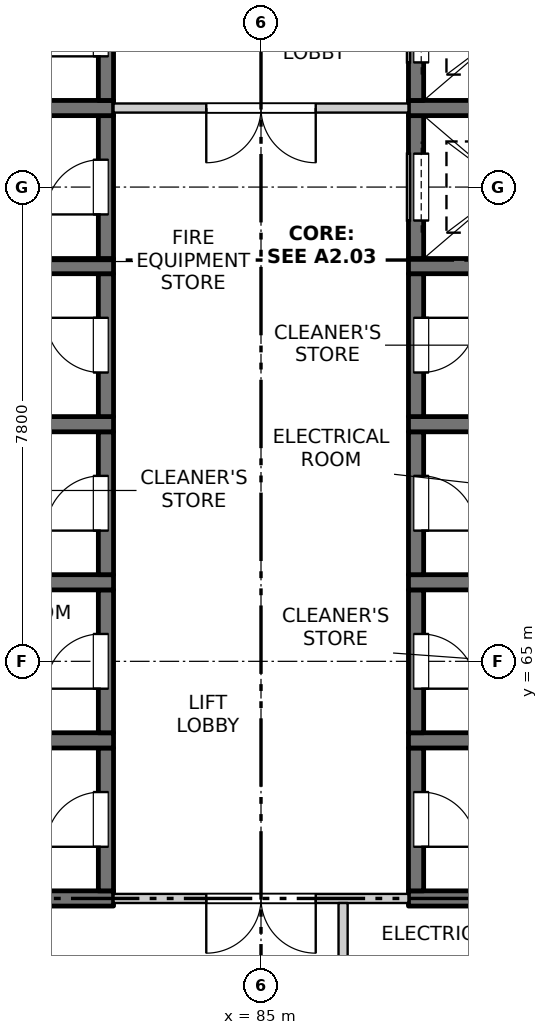
"""IFC4 building model, lengths in metres.
Left out: names, types, materials, properties, quantities, classifications, styles, units other than length and angle.
Written with IfcOpenShell. Run it as: python <this file> out.ifc"""

import sys

from ifc_helpers import new_model, si_unit, direction, frame, frame_2d, origin, place, context, subcontext, project, spatial, rectangle, extrude, element, fill, save


model = new_model("IFC4")
c1 = context("Model", 3, precision=1e-05, world=origin(), true_north=direction((0.0, 1.0)))
c2 = subcontext(c1, "Body", "Model", "MODEL_VIEW")
j1 = project(units=[si_unit("LENGTHUNIT", "METRE"), si_unit("PLANEANGLEUNIT", "RADIAN")], contexts=[c1])
p1 = place(None, origin())
s1 = spatial("IfcSite", under=j1, at=p1, CompositionType="ELEMENT")
p2 = place(p1, origin())
s2 = spatial("IfcBuilding", under=s1, at=p2, CompositionType="ELEMENT")
p3 = place(p2, frame((0.0, 0.0, 210.9)))
s3 = spatial("IfcBuildingStorey", under=s2, at=p3, CompositionType="ELEMENT", Elevation=210.9)
p4 = place(p3, frame((79.575, 61.1, -0.25), z_axis=(0.0, 0.0, 1.0), x_axis=(1.0, 0.0, 0.0)))
e1 = element("IfcWall", 1, at=p4, inside=s3, PredefinedType="SOLIDWALL", context=c2, shape_type="SweptSolid", body=[
    extrude(rectangle(XDim=3.0, YDim=0.25, at=frame_2d((1.5, 0.0))), origin(), (0.0, 0.0, 1.0), 3.4),
])
p5 = place(p3, frame((82.45, 61.225, -0.25), z_axis=(0.0, 0.0, 1.0), x_axis=(0.0, 1.0, 0.0)))
e2 = element("IfcWall", 2, at=p5, inside=s3, PredefinedType="SOLIDWALL", context=c2, shape_type="SweptSolid", body=[
    extrude(rectangle(XDim=2.35, YDim=0.25, at=frame_2d((1.175, 0.0))), origin(), (0.0, 0.0, 1.0), 3.4),
])
p6 = place(p5, frame((0.725, 0.0, 0.25)))
e3 = element("IfcOpeningElement", 3, at=p6, cuts=e2, PredefinedType="OPENING", context=c2, shape_type="SweptSolid", body=[
    extrude(rectangle(XDim=0.9, YDim=2.1, at=frame_2d((0.45, 1.05))), frame((0.0, 0.135, 0.0), z_axis=(0.0, -1.0, 0.0), x_axis=(1.0, 0.0, 0.0)), (0.0, 0.0, 1.0), 0.27),
])
p7 = place(p3, frame((79.575, 63.7, -0.25), z_axis=(0.0, 0.0, 1.0), x_axis=(1.0, 0.0, 0.0)))
e4 = element("IfcWall", 4, at=p7, inside=s3, PredefinedType="SOLIDWALL", context=c2, shape_type="SweptSolid", body=[
    extrude(rectangle(XDim=3.0, YDim=0.25, at=frame_2d((1.5, 0.0))), origin(), (0.0, 0.0, 1.0), 3.4),
])
p8 = place(p3, frame((82.45, 63.825, -0.25), z_axis=(0.0, 0.0, 1.0), x_axis=(0.0, 1.0, 0.0)))
e5 = element("IfcWall", 5, at=p8, inside=s3, PredefinedType="SOLIDWALL", context=c2, shape_type="SweptSolid", body=[
    extrude(rectangle(XDim=2.35, YDim=0.25, at=frame_2d((1.175, 0.0))), origin(), (0.0, 0.0, 1.0), 3.4),
])
p9 = place(p8, frame((0.725, 0.0, 0.25)))
e6 = element("IfcOpeningElement", 6, at=p9, cuts=e5, PredefinedType="OPENING", context=c2, shape_type="SweptSolid", body=[
    extrude(rectangle(XDim=0.9, YDim=2.1, at=frame_2d((0.45, 1.05))), frame((0.0, 0.135, 0.0), z_axis=(0.0, -1.0, 0.0), x_axis=(1.0, 0.0, 0.0)), (0.0, 0.0, 1.0), 0.27),
])
p10 = place(p3, frame((79.575, 66.3, -0.25), z_axis=(0.0, 0.0, 1.0), x_axis=(1.0, 0.0, 0.0)))
e7 = element("IfcWall", 7, at=p10, inside=s3, PredefinedType="SOLIDWALL", context=c2, shape_type="SweptSolid", body=[
    extrude(rectangle(XDim=3.0, YDim=0.25, at=frame_2d((1.5, 0.0))), origin(), (0.0, 0.0, 1.0), 3.4),
])
p11 = place(p3, frame((82.45, 66.425, -0.25), z_axis=(0.0, 0.0, 1.0), x_axis=(0.0, 1.0, 0.0)))
e8 = element("IfcWall", 8, at=p11, inside=s3, PredefinedType="SOLIDWALL", context=c2, shape_type="SweptSolid", body=[
    extrude(rectangle(XDim=2.35, YDim=0.25, at=frame_2d((1.175, 0.0))), origin(), (0.0, 0.0, 1.0), 3.4),
])
p12 = place(p11, frame((0.725, 0.0, 0.25)))
e9 = element("IfcOpeningElement", 9, at=p12, cuts=e8, PredefinedType="OPENING", context=c2, shape_type="SweptSolid", body=[
    extrude(rectangle(XDim=0.9, YDim=2.1, at=frame_2d((0.45, 1.05))), frame((0.0, 0.135, 0.0), z_axis=(0.0, -1.0, 0.0), x_axis=(1.0, 0.0, 0.0)), (0.0, 0.0, 1.0), 0.27),
])
p13 = place(p3, frame((79.575, 68.9, -0.25), z_axis=(0.0, 0.0, 1.0), x_axis=(1.0, 0.0, 0.0)))
e10 = element("IfcWall", 10, at=p13, inside=s3, PredefinedType="SOLIDWALL", context=c2, shape_type="SweptSolid", body=[
    extrude(rectangle(XDim=3.0, YDim=0.25, at=frame_2d((1.5, 0.0))), origin(), (0.0, 0.0, 1.0), 3.4),
])
p14 = place(p3, frame((82.45, 69.025, -0.25), z_axis=(0.0, 0.0, 1.0), x_axis=(0.0, 1.0, 0.0)))
e11 = element("IfcWall", 11, at=p14, inside=s3, PredefinedType="SOLIDWALL", context=c2, shape_type="SweptSolid", body=[
    extrude(rectangle(XDim=2.35, YDim=0.25, at=frame_2d((1.175, 0.0))), origin(), (0.0, 0.0, 1.0), 3.4),
])
p15 = place(p14, frame((0.725, 0.0, 0.25)))
e12 = element("IfcOpeningElement", 12, at=p15, cuts=e11, PredefinedType="OPENING", context=c2, shape_type="SweptSolid", body=[
    extrude(rectangle(XDim=0.9, YDim=2.1, at=frame_2d((0.45, 1.05))), frame((0.0, 0.135, 0.0), z_axis=(0.0, -1.0, 0.0), x_axis=(1.0, 0.0, 0.0)), (0.0, 0.0, 1.0), 0.27),
])
p16 = place(p3, frame((79.575, 71.5, -0.25), z_axis=(0.0, 0.0, 1.0), x_axis=(1.0, 0.0, 0.0)))
e13 = element("IfcWall", 13, at=p16, inside=s3, PredefinedType="SOLIDWALL", context=c2, shape_type="SweptSolid", body=[
    extrude(rectangle(XDim=3.0, YDim=0.25, at=frame_2d((1.5, 0.0))), origin(), (0.0, 0.0, 1.0), 3.4),
])
p17 = place(p3, frame((82.45, 71.625, -0.25), z_axis=(0.0, 0.0, 1.0), x_axis=(0.0, 1.0, 0.0)))
e14 = element("IfcWall", 14, at=p17, inside=s3, PredefinedType="SOLIDWALL", context=c2, shape_type="SweptSolid", body=[
    extrude(rectangle(XDim=2.35, YDim=0.25, at=frame_2d((1.175, 0.0))), origin(), (0.0, 0.0, 1.0), 3.4),
])
p18 = place(p17, frame((0.725, 0.0, 0.25)))
e15 = element("IfcOpeningElement", 15, at=p18, cuts=e14, PredefinedType="OPENING", context=c2, shape_type="SweptSolid", body=[
    extrude(rectangle(XDim=0.9, YDim=2.1, at=frame_2d((0.45, 1.05))), frame((0.0, 0.135, 0.0), z_axis=(0.0, -1.0, 0.0), x_axis=(1.0, 0.0, 0.0)), (0.0, 0.0, 1.0), 0.27),
])
p19 = place(p3, frame((79.575, 74.1, -0.25), z_axis=(0.0, 0.0, 1.0), x_axis=(1.0, 0.0, 0.0)))
e16 = element("IfcWall", 16, at=p19, inside=s3, PredefinedType="SOLIDWALL", context=c2, shape_type="SweptSolid", body=[
    extrude(rectangle(XDim=3.0, YDim=0.25, at=frame_2d((1.5, 0.0))), origin(), (0.0, 0.0, 1.0), 3.4),
])
p20 = place(p3, frame((82.45, 74.225, -0.25), z_axis=(0.0, 0.0, 1.0), x_axis=(0.0, 1.0, 0.0)))
e17 = element("IfcWall", 17, at=p20, inside=s3, PredefinedType="SOLIDWALL", context=c2, shape_type="SweptSolid", body=[
    extrude(rectangle(XDim=2.35, YDim=0.25, at=frame_2d((1.175, 0.0))), origin(), (0.0, 0.0, 1.0), 3.4),
])
p21 = place(p20, frame((0.725, 0.0, 0.25)))
e18 = element("IfcOpeningElement", 18, at=p21, cuts=e17, PredefinedType="OPENING", context=c2, shape_type="SweptSolid", body=[
    extrude(rectangle(XDim=0.9, YDim=2.1, at=frame_2d((0.45, 1.05))), frame((0.0, 0.135, 0.0), z_axis=(0.0, -1.0, 0.0), x_axis=(1.0, 0.0, 0.0)), (0.0, 0.0, 1.0), 0.27),
])
p22 = place(p3, frame((87.425, 61.1, -0.25), z_axis=(0.0, 0.0, 1.0), x_axis=(1.0, 0.0, 0.0)))
e19 = element("IfcWall", 19, at=p22, inside=s3, PredefinedType="SOLIDWALL", context=c2, shape_type="SweptSolid", body=[
    extrude(rectangle(XDim=3.0, YDim=0.25, at=frame_2d((1.5, 0.0))), origin(), (0.0, 0.0, 1.0), 3.4),
])
p23 = place(p3, frame((87.55, 61.225, -0.25), z_axis=(0.0, 0.0, 1.0), x_axis=(0.0, 1.0, 0.0)))
e20 = element("IfcWall", 20, at=p23, inside=s3, PredefinedType="SOLIDWALL", context=c2, shape_type="SweptSolid", body=[
    extrude(rectangle(XDim=2.35, YDim=0.25, at=frame_2d((1.175, 0.0))), origin(), (0.0, 0.0, 1.0), 3.4),
])
p24 = place(p23, frame((0.725, 0.0, 0.25)))
e21 = element("IfcOpeningElement", 21, at=p24, cuts=e20, PredefinedType="OPENING", context=c2, shape_type="SweptSolid", body=[
    extrude(rectangle(XDim=0.9, YDim=2.1, at=frame_2d((0.45, 1.05))), frame((0.0, 0.135, 0.0), z_axis=(0.0, -1.0, 0.0), x_axis=(1.0, 0.0, 0.0)), (0.0, 0.0, 1.0), 0.27),
])
p25 = place(p3, frame((87.425, 63.7, -0.25), z_axis=(0.0, 0.0, 1.0), x_axis=(1.0, 0.0, 0.0)))
e22 = element("IfcWall", 22, at=p25, inside=s3, PredefinedType="SOLIDWALL", context=c2, shape_type="SweptSolid", body=[
    extrude(rectangle(XDim=3.0, YDim=0.25, at=frame_2d((1.5, 0.0))), origin(), (0.0, 0.0, 1.0), 3.4),
])
p26 = place(p3, frame((87.55, 63.825, -0.25), z_axis=(0.0, 0.0, 1.0), x_axis=(0.0, 1.0, 0.0)))
e23 = element("IfcWall", 23, at=p26, inside=s3, PredefinedType="SOLIDWALL", context=c2, shape_type="SweptSolid", body=[
    extrude(rectangle(XDim=2.35, YDim=0.25, at=frame_2d((1.175, 0.0))), origin(), (0.0, 0.0, 1.0), 3.4),
])
p27 = place(p26, frame((0.725, 0.0, 0.25)))
e24 = element("IfcOpeningElement", 24, at=p27, cuts=e23, PredefinedType="OPENING", context=c2, shape_type="SweptSolid", body=[
    extrude(rectangle(XDim=0.9, YDim=2.1, at=frame_2d((0.45, 1.05))), frame((0.0, 0.135, 0.0), z_axis=(0.0, -1.0, 0.0), x_axis=(1.0, 0.0, 0.0)), (0.0, 0.0, 1.0), 0.27),
])
p28 = place(p3, frame((87.425, 66.3, -0.25), z_axis=(0.0, 0.0, 1.0), x_axis=(1.0, 0.0, 0.0)))
e25 = element("IfcWall", 25, at=p28, inside=s3, PredefinedType="SOLIDWALL", context=c2, shape_type="SweptSolid", body=[
    extrude(rectangle(XDim=3.0, YDim=0.25, at=frame_2d((1.5, 0.0))), origin(), (0.0, 0.0, 1.0), 3.4),
])
p29 = place(p3, frame((87.55, 66.425, -0.25), z_axis=(0.0, 0.0, 1.0), x_axis=(0.0, 1.0, 0.0)))
e26 = element("IfcWall", 26, at=p29, inside=s3, PredefinedType="SOLIDWALL", context=c2, shape_type="SweptSolid", body=[
    extrude(rectangle(XDim=2.35, YDim=0.25, at=frame_2d((1.175, 0.0))), origin(), (0.0, 0.0, 1.0), 3.4),
])
p30 = place(p29, frame((0.725, 0.0, 0.25)))
e27 = element("IfcOpeningElement", 27, at=p30, cuts=e26, PredefinedType="OPENING", context=c2, shape_type="SweptSolid", body=[
    extrude(rectangle(XDim=0.9, YDim=2.1, at=frame_2d((0.45, 1.05))), frame((0.0, 0.135, 0.0), z_axis=(0.0, -1.0, 0.0), x_axis=(1.0, 0.0, 0.0)), (0.0, 0.0, 1.0), 0.27),
])
p31 = place(p3, frame((87.425, 68.9, -0.25), z_axis=(0.0, 0.0, 1.0), x_axis=(1.0, 0.0, 0.0)))
e28 = element("IfcWall", 28, at=p31, inside=s3, PredefinedType="SOLIDWALL", context=c2, shape_type="SweptSolid", body=[
    extrude(rectangle(XDim=3.0, YDim=0.25, at=frame_2d((1.5, 0.0))), origin(), (0.0, 0.0, 1.0), 3.4),
])
p32 = place(p3, frame((87.55, 69.025, -0.25), z_axis=(0.0, 0.0, 1.0), x_axis=(0.0, 1.0, 0.0)))
e29 = element("IfcWall", 29, at=p32, inside=s3, PredefinedType="SOLIDWALL", context=c2, shape_type="SweptSolid", body=[
    extrude(rectangle(XDim=2.35, YDim=0.25, at=frame_2d((1.175, 0.0))), origin(), (0.0, 0.0, 1.0), 3.4),
])
p33 = place(p32, frame((0.725, 0.0, 0.25)))
e30 = element("IfcOpeningElement", 30, at=p33, cuts=e29, PredefinedType="OPENING", context=c2, shape_type="SweptSolid", body=[
    extrude(rectangle(XDim=0.9, YDim=2.1, at=frame_2d((0.45, 1.05))), frame((0.0, 0.135, 0.0), z_axis=(0.0, -1.0, 0.0), x_axis=(1.0, 0.0, 0.0)), (0.0, 0.0, 1.0), 0.27),
])
p34 = place(p3, frame((87.425, 71.5, -0.25), z_axis=(0.0, 0.0, 1.0), x_axis=(1.0, 0.0, 0.0)))
e31 = element("IfcWall", 31, at=p34, inside=s3, PredefinedType="SOLIDWALL", context=c2, shape_type="SweptSolid", body=[
    extrude(rectangle(XDim=3.0, YDim=0.25, at=frame_2d((1.5, 0.0))), origin(), (0.0, 0.0, 1.0), 3.4),
])
p35 = place(p3, frame((87.55, 71.625, -0.25), z_axis=(0.0, 0.0, 1.0), x_axis=(0.0, 1.0, 0.0)))
e32 = element("IfcWall", 32, at=p35, inside=s3, PredefinedType="SOLIDWALL", context=c2, shape_type="SweptSolid", body=[
    extrude(rectangle(XDim=2.35, YDim=0.25, at=frame_2d((1.175, 0.0))), origin(), (0.0, 0.0, 1.0), 3.4),
])
p36 = place(p35, frame((0.625, 0.0, 0.25)))
e33 = element("IfcOpeningElement", 33, at=p36, cuts=e32, PredefinedType="OPENING", context=c2, shape_type="SweptSolid", body=[
    extrude(rectangle(XDim=1.1, YDim=2.1, at=frame_2d((0.55, 1.05))), frame((0.0, 0.135, 0.0), z_axis=(0.0, -1.0, 0.0), x_axis=(1.0, 0.0, 0.0)), (0.0, 0.0, 1.0), 0.27),
])
p37 = place(p3, frame((87.425, 74.1, -0.25), z_axis=(0.0, 0.0, 1.0), x_axis=(1.0, 0.0, 0.0)))
e34 = element("IfcWall", 34, at=p37, inside=s3, PredefinedType="SOLIDWALL", context=c2, shape_type="SweptSolid", body=[
    extrude(rectangle(XDim=3.0, YDim=0.25, at=frame_2d((1.5, 0.0))), origin(), (0.0, 0.0, 1.0), 3.4),
])
p38 = place(p3, frame((87.55, 74.225, -0.25), z_axis=(0.0, 0.0, 1.0), x_axis=(0.0, 1.0, 0.0)))
e35 = element("IfcWall", 35, at=p38, inside=s3, PredefinedType="SOLIDWALL", context=c2, shape_type="SweptSolid", body=[
    extrude(rectangle(XDim=2.35, YDim=0.25, at=frame_2d((1.175, 0.0))), origin(), (0.0, 0.0, 1.0), 3.4),
])
p39 = place(p38, frame((0.625, 0.0, 0.25)))
e36 = element("IfcOpeningElement", 36, at=p39, cuts=e35, PredefinedType="OPENING", context=c2, shape_type="SweptSolid", body=[
    extrude(rectangle(XDim=1.1, YDim=2.1, at=frame_2d((0.55, 1.05))), frame((0.0, 0.135, 0.0), z_axis=(0.0, -1.0, 0.0), x_axis=(1.0, 0.0, 0.0)), (0.0, 0.0, 1.0), 0.27),
])
p40 = place(p3, frame((82.575, 61.1, 0.0), z_axis=(0.0, 0.0, 1.0), x_axis=(1.0, 0.0, 0.0)))
e37 = element("IfcWall", 37, at=p40, inside=s3, PredefinedType="PARTITIONING", context=c2, shape_type="SweptSolid", body=[
    extrude(rectangle(XDim=4.85, YDim=0.15, at=frame_2d((2.425, 0.0))), origin(), (0.0, 0.0, 1.0), 3.15),
])
p41 = place(p40, frame((1.525, 0.0, 0.0)))
e38 = element("IfcOpeningElement", 38, at=p41, cuts=e37, PredefinedType="OPENING", context=c2, shape_type="SweptSolid", body=[
    extrude(rectangle(XDim=1.8, YDim=2.1, at=frame_2d((0.9, 1.05))), frame((0.0, 0.085, 0.0), z_axis=(0.0, -1.0, 0.0), x_axis=(1.0, 0.0, 0.0)), (0.0, 0.0, 1.0), 0.17),
])
p42 = place(p3, frame((82.575, 74.1, 0.0), z_axis=(0.0, 0.0, 1.0), x_axis=(1.0, 0.0, 0.0)))
e39 = element("IfcWall", 39, at=p42, inside=s3, PredefinedType="PARTITIONING", context=c2, shape_type="SweptSolid", body=[
    extrude(rectangle(XDim=4.85, YDim=0.15, at=frame_2d((2.425, 0.0))), origin(), (0.0, 0.0, 1.0), 3.15),
])
p43 = place(p42, frame((1.525, 0.0, 0.0)))
e40 = element("IfcOpeningElement", 40, at=p43, cuts=e39, PredefinedType="OPENING", context=c2, shape_type="SweptSolid", body=[
    extrude(rectangle(XDim=1.8, YDim=2.1, at=frame_2d((0.9, 1.05))), frame((0.0, 0.085, 0.0), z_axis=(0.0, -1.0, 0.0), x_axis=(1.0, 0.0, 0.0)), (0.0, 0.0, 1.0), 0.17),
])
p44 = place(p3, frame((86.35, 55.45, 0.0), z_axis=(0.0, 0.0, 1.0), x_axis=(0.0, 1.0, 0.0)))
e41 = element("IfcWall", 41, at=p44, inside=s3, PredefinedType="PARTITIONING", context=c2, shape_type="SweptSolid", body=[
    extrude(rectangle(XDim=5.575, YDim=0.15, at=frame_2d((2.788, 0.0))), origin(), (0.0, 0.0, 1.0), 3.15),
])
p45 = place(p44, frame((2.25, 0.0, 0.0)))
e42 = element("IfcOpeningElement", 42, at=p45, cuts=e41, PredefinedType="OPENING", context=c2, shape_type="SweptSolid", body=[
    extrude(rectangle(XDim=0.9, YDim=2.1, at=frame_2d((0.45, 1.05))), frame((0.0, 0.085, 0.0), z_axis=(0.0, -1.0, 0.0), x_axis=(1.0, 0.0, 0.0)), (0.0, 0.0, 1.0), 0.17),
])
p46 = place(p41, origin())
e43 = element("IfcDoor", 43, at=p46, inside=s3, OperationType="DOUBLE_DOOR_SINGLE_SWING", PredefinedType="DOOR", context=c2, shape_type="SweptSolid", body=[
    extrude(rectangle(XDim=1.8, YDim=2.1, at=frame_2d((0.9, 1.05))), frame((0.0, 0.025, 0.0), z_axis=(0.0, -1.0, 0.0), x_axis=(1.0, 0.0, 0.0)), (0.0, 0.0, 1.0), 0.05),
])
fill(e38, e43)
p47 = place(p6, origin())
e44 = element("IfcDoor", 44, at=p47, inside=s3, OperationType="SINGLE_SWING_LEFT", PredefinedType="DOOR", context=c2, shape_type="SweptSolid", body=[
    extrude(rectangle(XDim=0.9, YDim=2.1, at=frame_2d((0.45, 1.05))), frame((0.0, 0.11, 0.0), z_axis=(0.0, -1.0, 0.0), x_axis=(1.0, 0.0, 0.0)), (0.0, 0.0, 1.0), 0.05),
])
fill(e3, e44)
p48 = place(p24, origin())
e45 = element("IfcDoor", 45, at=p48, inside=s3, OperationType="SINGLE_SWING_RIGHT", PredefinedType="DOOR", context=c2, shape_type="SweptSolid", body=[
    extrude(rectangle(XDim=0.9, YDim=2.1, at=frame_2d((0.45, 1.05))), frame((0.0, -0.06, 0.0), z_axis=(0.0, -1.0, 0.0), x_axis=(1.0, 0.0, 0.0)), (0.0, 0.0, 1.0), 0.05),
])
fill(e21, e45)
p49 = place(p9, origin())
e46 = element("IfcDoor", 46, at=p49, inside=s3, OperationType="SINGLE_SWING_LEFT", PredefinedType="DOOR", context=c2, shape_type="SweptSolid", body=[
    extrude(rectangle(XDim=0.9, YDim=2.1, at=frame_2d((0.45, 1.05))), frame((0.0, 0.11, 0.0), z_axis=(0.0, -1.0, 0.0), x_axis=(1.0, 0.0, 0.0)), (0.0, 0.0, 1.0), 0.05),
])
fill(e6, e46)
p50 = place(p27, origin())
e47 = element("IfcDoor", 47, at=p50, inside=s3, OperationType="SINGLE_SWING_RIGHT", PredefinedType="DOOR", context=c2, shape_type="SweptSolid", body=[
    extrude(rectangle(XDim=0.9, YDim=2.1, at=frame_2d((0.45, 1.05))), frame((0.0, -0.06, 0.0), z_axis=(0.0, -1.0, 0.0), x_axis=(1.0, 0.0, 0.0)), (0.0, 0.0, 1.0), 0.05),
])
fill(e24, e47)
p51 = place(p12, origin())
e48 = element("IfcDoor", 48, at=p51, inside=s3, OperationType="SINGLE_SWING_LEFT", PredefinedType="DOOR", context=c2, shape_type="SweptSolid", body=[
    extrude(rectangle(XDim=0.9, YDim=2.1, at=frame_2d((0.45, 1.05))), frame((0.0, 0.11, 0.0), z_axis=(0.0, -1.0, 0.0), x_axis=(1.0, 0.0, 0.0)), (0.0, 0.0, 1.0), 0.05),
])
fill(e9, e48)
p52 = place(p30, origin())
e49 = element("IfcDoor", 49, at=p52, inside=s3, OperationType="SINGLE_SWING_RIGHT", PredefinedType="DOOR", context=c2, shape_type="SweptSolid", body=[
    extrude(rectangle(XDim=0.9, YDim=2.1, at=frame_2d((0.45, 1.05))), frame((0.0, -0.06, 0.0), z_axis=(0.0, -1.0, 0.0), x_axis=(1.0, 0.0, 0.0)), (0.0, 0.0, 1.0), 0.05),
])
fill(e27, e49)
p53 = place(p15, origin())
e50 = element("IfcDoor", 50, at=p53, inside=s3, OperationType="SINGLE_SWING_RIGHT", PredefinedType="DOOR", context=c2, shape_type="SweptSolid", body=[
    extrude(rectangle(XDim=0.9, YDim=2.1, at=frame_2d((0.45, 1.05))), frame((0.0, 0.11, 0.0), z_axis=(0.0, -1.0, 0.0), x_axis=(1.0, 0.0, 0.0)), (0.0, 0.0, 1.0), 0.05),
])
fill(e12, e50)
p54 = place(p33, origin())
e51 = element("IfcDoor", 51, at=p54, inside=s3, OperationType="SINGLE_SWING_LEFT", PredefinedType="DOOR", context=c2, shape_type="SweptSolid", body=[
    extrude(rectangle(XDim=0.9, YDim=2.1, at=frame_2d((0.45, 1.05))), frame((0.0, -0.06, 0.0), z_axis=(0.0, -1.0, 0.0), x_axis=(1.0, 0.0, 0.0)), (0.0, 0.0, 1.0), 0.05),
])
fill(e30, e51)
p55 = place(p18, origin())
e52 = element("IfcDoor", 52, at=p55, inside=s3, OperationType="SINGLE_SWING_LEFT", PredefinedType="DOOR", context=c2, shape_type="SweptSolid", body=[
    extrude(rectangle(XDim=0.9, YDim=2.1, at=frame_2d((0.45, 1.05))), frame((0.0, 0.11, 0.0), z_axis=(0.0, -1.0, 0.0), x_axis=(1.0, 0.0, 0.0)), (0.0, 0.0, 1.0), 0.05),
])
fill(e15, e52)
p56 = place(p36, origin())
e53 = element("IfcDoor", 53, at=p56, inside=s3, OperationType="SLIDING_TO_LEFT", PredefinedType="DOOR", context=c2, shape_type="SweptSolid", body=[
    extrude(rectangle(XDim=1.1, YDim=2.1, at=frame_2d((0.55, 1.05))), frame((0.0, -0.06, 0.0), z_axis=(0.0, -1.0, 0.0), x_axis=(1.0, 0.0, 0.0)), (0.0, 0.0, 1.0), 0.05),
])
fill(e33, e53)
p57 = place(p43, origin())
e54 = element("IfcDoor", 54, at=p57, inside=s3, OperationType="DOUBLE_DOOR_SINGLE_SWING", PredefinedType="DOOR", context=c2, shape_type="SweptSolid", body=[
    extrude(rectangle(XDim=1.8, YDim=2.1, at=frame_2d((0.9, 1.05))), frame((0.0, 0.025, 0.0), z_axis=(0.0, -1.0, 0.0), x_axis=(1.0, 0.0, 0.0)), (0.0, 0.0, 1.0), 0.05),
])
fill(e40, e54)
p58 = place(p21, origin())
e55 = element("IfcDoor", 55, at=p58, inside=s3, OperationType="SINGLE_SWING_LEFT", PredefinedType="DOOR", context=c2, shape_type="SweptSolid", body=[
    extrude(rectangle(XDim=0.9, YDim=2.1, at=frame_2d((0.45, 1.05))), frame((0.0, 0.11, 0.0), z_axis=(0.0, -1.0, 0.0), x_axis=(1.0, 0.0, 0.0)), (0.0, 0.0, 1.0), 0.05),
])
fill(e18, e55)
p59 = place(p39, origin())
e56 = element("IfcDoor", 56, at=p59, inside=s3, OperationType="SLIDING_TO_LEFT", PredefinedType="DOOR", context=c2, shape_type="SweptSolid", body=[
    extrude(rectangle(XDim=1.1, YDim=2.1, at=frame_2d((0.55, 1.05))), frame((0.0, -0.06, 0.0), z_axis=(0.0, -1.0, 0.0), x_axis=(1.0, 0.0, 0.0)), (0.0, 0.0, 1.0), 0.05),
])
fill(e36, e56)
save(model, sys.argv[1])
